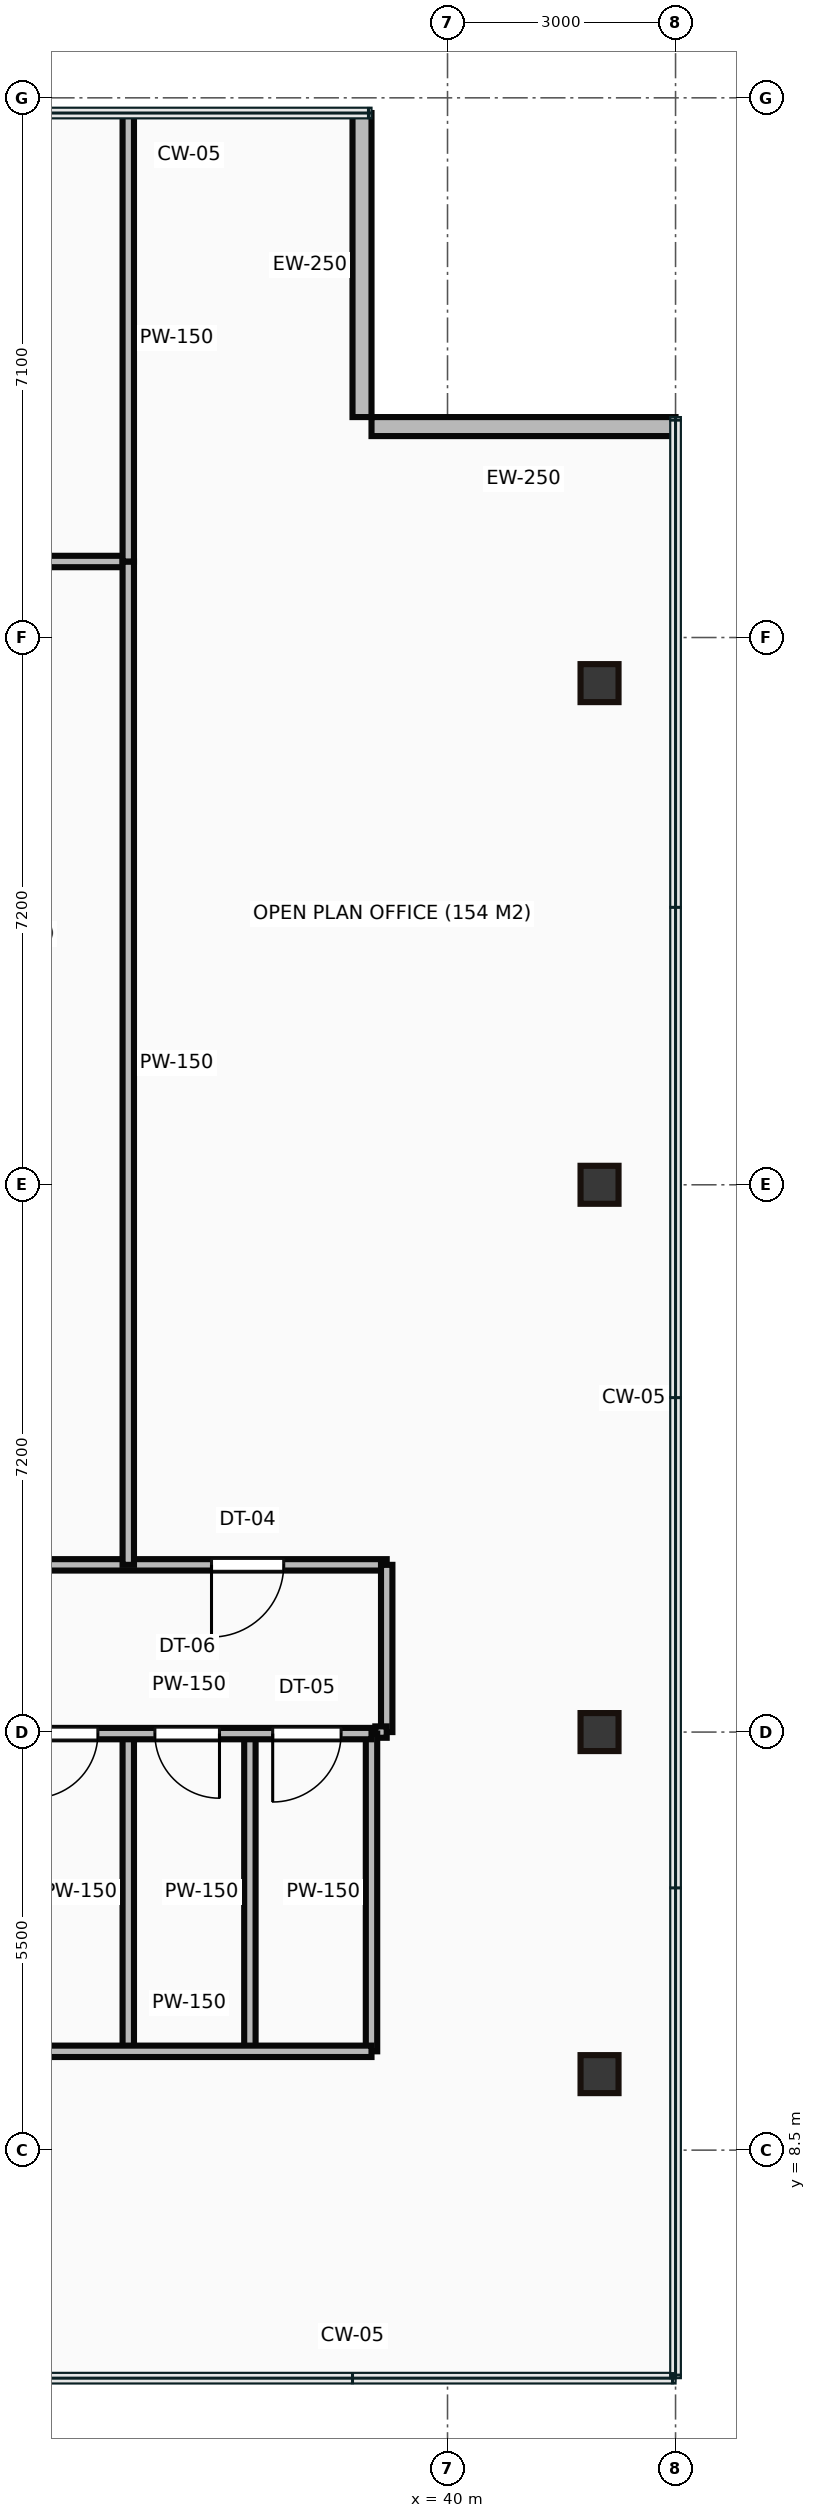
"""IFC4 building model, lengths in metres.
Left out: names, types, materials, properties, quantities, classifications, styles, units other than length and angle.
Written with IfcOpenShell. Run it as: python <this file> out.ifc"""

import sys

from ifc_helpers import new_model, si_unit, direction, frame, frame_2d, origin, origin_2d, place, context, subcontext, project, spatial, rectangle, hollow_rectangle, extrude, source, transform, mapped, element, fill, save


model = new_model("IFC4")
c1 = context("Model", 3, precision=1e-05, world=origin(), true_north=direction((0.0, 1.0)))
c2 = subcontext(c1, "Body", "Model", "MODEL_VIEW")
j1 = project(units=[si_unit("LENGTHUNIT", "METRE"), si_unit("PLANEANGLEUNIT", "RADIAN")], contexts=[c1])
p1 = place(None, origin())
s1 = spatial("IfcSite", under=j1, at=p1, CompositionType="ELEMENT")
p2 = place(p1, origin())
s2 = spatial("IfcBuilding", under=s1, at=p2, CompositionType="ELEMENT")
p3 = place(p2, frame((0.0, 0.0, 203.2)))
s3 = spatial("IfcBuildingStorey", under=s2, at=p3, CompositionType="ELEMENT", Elevation=203.2)
m1 = source(origin(), c2, "Body", "SweptSolid", [
    extrude(hollow_rectangle(XDim=0.5, YDim=0.5, WallThickness=0.022, at=origin_2d()), origin(), (0.0, 0.0, 1.0), 3.65),
])
for number, where, z_axis, x_axis in (
    (1, (42.0, 9.5, 0.0), (0.0, 0.0, 1.0), (1.0, 0.0, 0.0)),
    (2, (42.0, 14.0, 0.0), (0.0, 0.0, 1.0), (1.0, 0.0, 0.0)),
    (3, (42.0, 21.2, 0.0), (0.0, 0.0, 1.0), (1.0, 0.0, 0.0)),
    (4, (42.0, 27.8, 0.0), (0.0, 0.0, 1.0), (1.0, 0.0, 0.0)),
):
    element("IfcColumn", number, at=place(p3, frame(where, z_axis=z_axis, x_axis=x_axis)), inside=s3, PredefinedType="COLUMN", context=c2, shape_type="MappedRepresentation", body=[
        mapped(m1, transform((0.0, 0.0, 0.0))),
    ])
m2 = source(origin(), c2, "Body", "SweptSolid", [
    extrude(rectangle(XDim=4.0, YDim=0.25, at=frame_2d((2.0, 0.0))), origin(), (0.0, 0.0, 1.0), 3.4),
])
for number, where, z_axis, x_axis in (
    (5, (43.0, 31.175, 0.0), (0.0, 0.0, 1.0), (-1.0, 0.0, 0.0)),
    (6, (38.875, 31.3, 0.0), (0.0, 0.0, 1.0), (0.0, 1.0, 0.0)),
):
    element("IfcWall", number, at=place(p3, frame(where, z_axis=z_axis, x_axis=x_axis)), inside=s3, PredefinedType="STANDARD", context=c2, shape_type="MappedRepresentation", body=[
        mapped(m2, transform((0.0, 0.0, 0.0))),
    ])
m3 = source(origin(), c2, "Body", "SweptSolid", [
    extrude(rectangle(XDim=4.8, YDim=0.15, at=frame_2d((2.4, 0.0))), origin(), (0.0, 0.0, 1.0), 2.787),
])
p4 = place(p3, frame((34.2, 13.98, 0.0), z_axis=(0.0, 0.0, 1.0), x_axis=(1.0, 0.0, 0.0)))
e7 = element("IfcWall", 7, at=p4, inside=s3, PredefinedType="PARTITIONING", context=c2, shape_type="MappedRepresentation", body=[
    mapped(m3, transform((0.0, 0.0, 0.0))),
])
p5 = place(p4, frame((0.35, 0.0, 0.0)))
e8 = element("IfcOpeningElement", 8, at=p5, cuts=e7, PredefinedType="OPENING", context=c2, shape_type="SweptSolid", body=[
    extrude(rectangle(XDim=0.85, YDim=2.1, at=frame_2d((0.425, 1.05))), frame((0.0, 0.085, 0.0), z_axis=(0.0, -1.0, 0.0), x_axis=(1.0, 0.0, 0.0)), (0.0, 0.0, 1.0), 0.17),
])
p6 = place(p4, frame((1.95, 0.0, 0.0)))
e9 = element("IfcOpeningElement", 9, at=p6, cuts=e7, PredefinedType="OPENING", context=c2, shape_type="SweptSolid", body=[
    extrude(rectangle(XDim=0.85, YDim=2.1, at=frame_2d((0.425, 1.05))), frame((0.0, 0.085, 0.0), z_axis=(0.0, -1.0, 0.0), x_axis=(1.0, 0.0, 0.0)), (0.0, 0.0, 1.0), 0.17),
])
p7 = place(p4, frame((3.5, 0.0, 0.0)))
e10 = element("IfcOpeningElement", 10, at=p7, cuts=e7, PredefinedType="OPENING", context=c2, shape_type="SweptSolid", body=[
    extrude(rectangle(XDim=0.9, YDim=2.1, at=frame_2d((0.45, 1.05))), frame((0.0, 0.085, 0.0), z_axis=(0.0, -1.0, 0.0), x_axis=(1.0, 0.0, 0.0)), (0.0, 0.0, 1.0), 0.17),
])
m4 = source(origin(), c2, "Body", "SweptSolid", [
    extrude(rectangle(XDim=4.8, YDim=0.15, at=frame_2d((2.4, 0.0))), origin(), (0.0, 0.0, 1.0), 3.4),
])
p8 = place(p3, frame((34.2, 9.8, 0.0), z_axis=(0.0, 0.0, 1.0), x_axis=(1.0, 0.0, 0.0)))
e11 = element("IfcWall", 11, at=p8, inside=s3, PredefinedType="PARTITIONING", context=c2, shape_type="MappedRepresentation", body=[
    mapped(m4, transform((0.0, 0.0, 0.0))),
])
m5 = source(origin(), c2, "Body", "SweptSolid", [
    extrude(rectangle(XDim=4.18, YDim=0.15, at=frame_2d((2.09, 0.0))), origin(), (0.0, 0.0, 1.0), 3.4),
])
for number, where, z_axis, x_axis in (
    (12, (39.0, 9.8, 0.0), (0.0, 0.0, 1.0), (0.0, 1.0, 0.0)),
    (13, (35.8, 9.8, 0.0), (0.0, 0.0, 1.0), (0.0, 1.0, 0.0)),
    (14, (37.4, 9.8, 0.0), (0.0, 0.0, 1.0), (0.0, 1.0, 0.0)),
):
    element("IfcWall", number, at=place(p3, frame(where, z_axis=z_axis, x_axis=x_axis)), inside=s3, PredefinedType="PARTITIONING", context=c2, shape_type="MappedRepresentation", body=[
        mapped(m5, transform((0.0, 0.0, 0.0))),
    ])
m6 = source(origin(), c2, "Body", "SweptSolid", [
    extrude(rectangle(XDim=10.2, YDim=0.15, at=frame_2d((5.1, 0.0))), origin(), (0.0, 0.0, 1.0), 3.4),
])
p9 = place(p3, frame((29.0, 16.2, 0.0), z_axis=(0.0, 0.0, 1.0), x_axis=(1.0, 0.0, 0.0)))
e15 = element("IfcWall", 15, at=p9, inside=s3, PredefinedType="PARTITIONING", context=c2, shape_type="MappedRepresentation", body=[
    mapped(m6, transform((0.0, 0.0, 0.0))),
])
p10 = place(p9, frame((7.895, 0.0, 0.0)))
e16 = element("IfcOpeningElement", 16, at=p10, cuts=e15, PredefinedType="OPENING", context=c2, shape_type="SweptSolid", body=[
    extrude(rectangle(XDim=0.95, YDim=2.15, at=frame_2d((0.475, 1.075))), frame((0.0, 0.085, 0.0), z_axis=(0.0, -1.0, 0.0), x_axis=(1.0, 0.0, 0.0)), (0.0, 0.0, 1.0), 0.17),
])
m7 = source(origin(), c2, "Body", "SweptSolid", [
    extrude(rectangle(XDim=2.2, YDim=0.15, at=frame_2d((1.1, 0.0))), origin(), (0.0, 0.0, 1.0), 3.4),
])
p11 = place(p3, frame((39.2, 16.2, 0.0), z_axis=(0.0, 0.0, 1.0), x_axis=(0.0, -1.0, 0.0)))
e17 = element("IfcWall", 17, at=p11, inside=s3, PredefinedType="PARTITIONING", context=c2, shape_type="MappedRepresentation", body=[
    mapped(m7, transform((0.0, 0.0, 0.0))),
])
m8 = source(origin(), c2, "Body", "SweptSolid", [
    extrude(rectangle(XDim=0.15, YDim=0.15, at=frame_2d((0.075, 0.0))), origin(), (0.0, 0.0, 1.0), 3.4),
])
p12 = place(p3, frame((39.2, 14.0, 0.0), z_axis=(0.0, 0.0, 1.0), x_axis=(-1.0, 0.0, 0.0)))
e18 = element("IfcWall", 18, at=p12, inside=s3, PredefinedType="PARTITIONING", context=c2, shape_type="MappedRepresentation", body=[
    mapped(m8, transform((0.0, 0.0, 0.0))),
])
m9 = source(origin(), c2, "Body", "SweptSolid", [
    extrude(rectangle(XDim=6.8, YDim=0.15, at=frame_2d((3.4, 0.0))), origin(), (0.0, 0.0, 1.0), 3.4),
])
p13 = place(p3, frame((35.8, 29.4, 0.0), z_axis=(0.0, 0.0, 1.0), x_axis=(-1.0, 0.0, 0.0)))
e19 = element("IfcWall", 19, at=p13, inside=s3, PredefinedType="PARTITIONING", context=c2, shape_type="MappedRepresentation", body=[
    mapped(m9, transform((0.0, 0.0, 0.0))),
])
m10 = source(origin(), c2, "Body", "SweptSolid", [
    extrude(rectangle(XDim=13.2, YDim=0.15, at=frame_2d((6.6, 0.0))), origin(), (0.0, 0.0, 1.0), 3.4),
])
p14 = place(p3, frame((35.8, 29.4, 0.0), z_axis=(0.0, 0.0, 1.0), x_axis=(0.0, -1.0, 0.0)))
e20 = element("IfcWall", 20, at=p14, inside=s3, PredefinedType="PARTITIONING", context=c2, shape_type="MappedRepresentation", body=[
    mapped(m10, transform((0.0, 0.0, 0.0))),
])
m11 = source(origin(), c2, "Body", "SweptSolid", [
    extrude(rectangle(XDim=5.88, YDim=0.15, at=frame_2d((2.94, 0.0))), origin(), (0.0, 0.0, 1.0), 3.4),
])
p15 = place(p3, frame((35.8, 35.28, 0.0), z_axis=(0.0, 0.0, 1.0), x_axis=(0.0, -1.0, 0.0)))
e21 = element("IfcWall", 21, at=p15, inside=s3, PredefinedType="PARTITIONING", context=c2, shape_type="MappedRepresentation", body=[
    mapped(m11, transform((0.0, 0.0, 0.0))),
])
m12 = source(origin(), c2, "Body", "SweptSolid", [
    extrude(rectangle(XDim=0.85, YDim=2.1, at=frame_2d((0.425, 1.05))), frame((0.0, 0.025, 0.0), z_axis=(0.0, -1.0, 0.0), x_axis=(1.0, 0.0, 0.0)), (0.0, 0.0, 1.0), 0.05),
])
p16 = place(p5, frame((0.85, 0.0, 0.0), z_axis=(0.0, 0.0, 1.0), x_axis=(-1.0, 0.0, 0.0)))
e22 = element("IfcDoor", 22, at=p16, inside=s3, OperationType="SINGLE_SWING_LEFT", PredefinedType="DOOR", context=c2, shape_type="MappedRepresentation", body=[
    mapped(m12, transform((0.0, 0.0, 0.0))),
])
fill(e8, e22)
p17 = place(p6, frame((0.85, 0.0, 0.0), z_axis=(0.0, 0.0, 1.0), x_axis=(-1.0, 0.0, 0.0)))
e23 = element("IfcDoor", 23, at=p17, inside=s3, OperationType="SINGLE_SWING_RIGHT", PredefinedType="DOOR", context=c2, shape_type="MappedRepresentation", body=[
    mapped(m12, transform((0.0, 0.0, 0.0))),
])
fill(e9, e23)
m13 = source(origin(), c2, "Body", "SweptSolid", [
    extrude(rectangle(XDim=0.9, YDim=2.1, at=frame_2d((0.45, 1.05))), frame((0.0, 0.025, 0.0), z_axis=(0.0, -1.0, 0.0), x_axis=(1.0, 0.0, 0.0)), (0.0, 0.0, 1.0), 0.05),
])
p18 = place(p7, frame((0.9, 0.0, 0.0), z_axis=(0.0, 0.0, 1.0), x_axis=(-1.0, 0.0, 0.0)))
e24 = element("IfcDoor", 24, at=p18, inside=s3, OperationType="SINGLE_SWING_LEFT", PredefinedType="DOOR", context=c2, shape_type="MappedRepresentation", body=[
    mapped(m13, transform((0.0, 0.0, 0.0))),
])
fill(e10, e24)
m14 = source(origin(), c2, "Body", "SweptSolid", [
    extrude(rectangle(XDim=0.95, YDim=2.15, at=frame_2d((0.475, 1.075))), frame((0.0, 0.025, 0.0), z_axis=(0.0, -1.0, 0.0), x_axis=(1.0, 0.0, 0.0)), (0.0, 0.0, 1.0), 0.05),
])
p19 = place(p10, origin())
e25 = element("IfcDoor", 25, at=p19, inside=s3, OperationType="SINGLE_SWING_LEFT", PredefinedType="DOOR", context=c2, shape_type="MappedRepresentation", body=[
    mapped(m14, transform((0.0, 0.0, 0.0))),
])
fill(e16, e25)
save(model, sys.argv[1])
